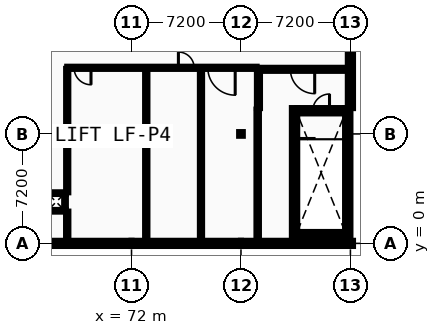
"""IFC4 building model, lengths in metres.
Left out: names, types, materials, properties, quantities, classifications, styles, units other than length and angle.
Written with IfcOpenShell. Run it as: python <this file> out.ifc"""

import sys

from ifc_helpers import new_model, si_unit, direction, frame, frame_2d, origin, origin_2d, place, context, subcontext, project, spatial, rectangle, i_section, extrude, element, fill, save


model = new_model("IFC4")
c1 = context("Model", 3, precision=1e-05, world=origin(), true_north=direction((0.0, 1.0)))
c2 = subcontext(c1, "Body", "Model", "MODEL_VIEW")
j1 = project(units=[si_unit("LENGTHUNIT", "METRE"), si_unit("PLANEANGLEUNIT", "RADIAN")], contexts=[c1])
p1 = place(None, origin())
s1 = spatial("IfcSite", under=j1, at=p1, CompositionType="ELEMENT")
p2 = place(p1, origin())
s2 = spatial("IfcBuilding", under=s1, at=p2, CompositionType="ELEMENT")
p3 = place(p2, frame((0.0, 0.0, 18.4)))
s3 = spatial("IfcBuildingStorey", under=s2, at=p3, CompositionType="ELEMENT", Elevation=18.4)
for number, where, z_axis, x_axis in (
    (1, (72.0, 0.0, 0.0), (0.0, 0.0, 1.0), (1.0, 0.0, 0.0)),
    (2, (72.0, 7.2, 0.0), (0.0, 0.0, 1.0), (1.0, 0.0, 0.0)),
    (3, (79.2, 0.0, 0.0), (0.0, 0.0, 1.0), (1.0, 0.0, 0.0)),
    (4, (79.2, 7.2, 0.0), (0.0, 0.0, 1.0), (1.0, 0.0, 0.0)),
    (5, (86.4, 0.0, 0.0), (0.0, 0.0, 1.0), (1.0, 0.0, 0.0)),
):
    element("IfcColumn", number, at=place(p3, frame(where, z_axis=z_axis, x_axis=x_axis)), inside=s3, PredefinedType="COLUMN", context=c2, shape_type="SweptSolid", body=[
        extrude(i_section(OverallWidth=0.24, OverallDepth=0.24, WebThickness=0.01, FlangeThickness=0.017, FilletRadius=0.021, at=origin_2d()), origin(), (0.0, 0.0, 1.0), 4.4),
    ])
p4 = place(p3, frame((64.8, 0.0, 0.0), z_axis=(0.0, 0.0, 1.0), x_axis=(1.0, 0.0, 0.0)))
e6 = element("IfcWall", 6, at=p4, inside=s3, PredefinedType="STANDARD", context=c2, shape_type="SweptSolid", body=[
    extrude(rectangle(XDim=7.2, YDim=0.34, at=frame_2d((3.6, 0.0))), origin(), (0.0, 0.0, 1.0), 4.035),
])
p5 = place(p4, frame((1.645, 0.0, 0.95)))
e7 = element("IfcOpeningElement", 7, at=p5, cuts=e6, PredefinedType="OPENING", context=c2, shape_type="SweptSolid", body=[
    extrude(rectangle(XDim=1.03, YDim=1.368, at=frame_2d((0.515, 0.684))), frame((0.0, 0.18, 0.0), z_axis=(0.0, -1.0, 0.0), x_axis=(1.0, 0.0, 0.0)), (0.0, 0.0, 1.0), 0.36),
])
p6 = place(p4, frame((4.525, 0.0, 0.95)))
e8 = element("IfcOpeningElement", 8, at=p6, cuts=e6, PredefinedType="OPENING", context=c2, shape_type="SweptSolid", body=[
    extrude(rectangle(XDim=1.03, YDim=1.368, at=frame_2d((0.515, 0.684))), frame((0.0, 0.18, 0.0), z_axis=(0.0, -1.0, 0.0), x_axis=(1.0, 0.0, 0.0)), (0.0, 0.0, 1.0), 0.36),
])
p7 = place(p3, frame((72.0, 0.0, 0.0), z_axis=(0.0, 0.0, 1.0), x_axis=(1.0, 0.0, 0.0)))
e9 = element("IfcWall", 9, at=p7, inside=s3, PredefinedType="STANDARD", context=c2, shape_type="SweptSolid", body=[
    extrude(rectangle(XDim=7.2, YDim=0.34, at=frame_2d((3.6, 0.0))), origin(), (0.0, 0.0, 1.0), 4.035),
])
p8 = place(p7, frame((1.628, 0.0, 0.95)))
e10 = element("IfcOpeningElement", 10, at=p8, cuts=e9, PredefinedType="OPENING", context=c2, shape_type="SweptSolid", body=[
    extrude(rectangle(XDim=1.064, YDim=1.368, at=frame_2d((0.532, 0.684))), frame((0.0, 0.18, 0.0), z_axis=(0.0, -1.0, 0.0), x_axis=(1.0, 0.0, 0.0)), (0.0, 0.0, 1.0), 0.36),
])
p9 = place(p3, frame((79.2, 0.0, 0.0), z_axis=(0.0, 0.0, 1.0), x_axis=(1.0, 0.0, 0.0)))
e11 = element("IfcWall", 11, at=p9, inside=s3, PredefinedType="STANDARD", context=c2, shape_type="SweptSolid", body=[
    extrude(rectangle(XDim=7.37, YDim=0.34, at=frame_2d((3.685, 0.0))), origin(), (0.0, 0.0, 1.0), 4.035),
])
p10 = place(p9, frame((1.662, 0.0, 0.95)))
e12 = element("IfcOpeningElement", 12, at=p10, cuts=e11, PredefinedType="OPENING", context=c2, shape_type="SweptSolid", body=[
    extrude(rectangle(XDim=1.098, YDim=1.368, at=frame_2d((0.549, 0.684))), frame((0.0, 0.18, 0.0), z_axis=(0.0, -1.0, 0.0), x_axis=(1.0, 0.0, 0.0)), (0.0, 0.0, 1.0), 0.36),
])
p11 = place(p9, frame((4.61, 0.0, 0.95)))
e13 = element("IfcOpeningElement", 13, at=p11, cuts=e11, PredefinedType="OPENING", context=c2, shape_type="SweptSolid", body=[
    extrude(rectangle(XDim=1.098, YDim=1.368, at=frame_2d((0.549, 0.684))), frame((0.0, 0.18, 0.0), z_axis=(0.0, -1.0, 0.0), x_axis=(1.0, 0.0, 0.0)), (0.0, 0.0, 1.0), 0.36),
])
p12 = place(p3, frame((86.4, 8.9, 0.0), z_axis=(0.0, 0.0, 1.0), x_axis=(0.0, 1.0, 0.0)))
e14 = element("IfcWall", 14, at=p12, inside=s3, PredefinedType="STANDARD", context=c2, shape_type="SweptSolid", body=[
    extrude(rectangle(XDim=5.5, YDim=0.34, at=frame_2d((2.75, 0.0))), origin(), (0.0, 0.0, 1.0), 4.11),
])
p13 = place(p3, frame((82.9, 0.575, 0.0), z_axis=(0.0, 0.0, 1.0), x_axis=(1.0, 0.0, 0.0)))
e15 = element("IfcWall", 15, at=p13, inside=s3, PredefinedType="SHEAR", context=c2, shape_type="SweptSolid", body=[
    extrude(rectangle(XDim=3.15, YDim=0.35, at=frame_2d((1.575, 0.0))), origin(), (0.0, 0.0, 1.0), 4.18),
])
p14 = place(p3, frame((82.9, 8.725, 0.0), z_axis=(0.0, 0.0, 1.0), x_axis=(1.0, 0.0, 0.0)))
e16 = element("IfcWall", 16, at=p14, inside=s3, PredefinedType="SHEAR", context=c2, shape_type="SweptSolid", body=[
    extrude(rectangle(XDim=3.15, YDim=0.35, at=frame_2d((1.575, 0.0))), origin(), (0.0, 0.0, 1.0), 4.18),
])
p15 = place(p14, frame((1.025, 0.0, 0.0)))
e17 = element("IfcOpeningElement", 17, at=p15, cuts=e16, PredefinedType="OPENING", context=c2, shape_type="SweptSolid", body=[
    extrude(rectangle(XDim=1.1, YDim=2.15, at=frame_2d((0.55, 1.075))), frame((0.0, 0.185, 0.0), z_axis=(0.0, -1.0, 0.0), x_axis=(1.0, 0.0, 0.0)), (0.0, 0.0, 1.0), 0.37),
])
for number, where, z_axis, x_axis in (
    (18, (82.725, 0.17, 0.0), (0.0, 0.0, 1.0), (0.0, 1.0, 0.0)),
    (19, (86.225, 0.17, 0.0), (0.0, 0.0, 1.0), (0.0, 1.0, 0.0)),
):
    element("IfcWall", number, at=place(p3, frame(where, z_axis=z_axis, x_axis=x_axis)), inside=s3, PredefinedType="SHEAR", context=c2, shape_type="SweptSolid", body=[
        extrude(rectangle(XDim=8.73, YDim=0.35, at=frame_2d((4.365, 0.0))), origin(), (0.0, 0.0, 1.0), 4.18),
    ])
p16 = place(p3, frame((80.45, 11.45, 0.0), z_axis=(0.0, 0.0, 1.0), x_axis=(1.0, 0.0, 0.0)))
e20 = element("IfcWall", 20, at=p16, inside=s3, PredefinedType="PARTITIONING", context=c2, shape_type="SweptSolid", body=[
    extrude(rectangle(XDim=5.6, YDim=0.2, at=frame_2d((2.8, 0.0))), origin(), (0.0, 0.0, 1.0), 4.18),
])
p17 = place(p16, frame((2.0, 0.0, 0.0)))
e21 = element("IfcOpeningElement", 21, at=p17, cuts=e20, PredefinedType="OPENING", context=c2, shape_type="SweptSolid", body=[
    extrude(rectangle(XDim=1.6, YDim=2.2, at=frame_2d((0.8, 1.1))), frame((0.0, 0.11, 0.0), z_axis=(0.0, -1.0, 0.0), x_axis=(1.0, 0.0, 0.0)), (0.0, 0.0, 1.0), 0.22),
])
p18 = place(p3, frame((80.35, 8.9, 0.0), z_axis=(0.0, 0.0, 1.0), x_axis=(0.0, 1.0, 0.0)))
e22 = element("IfcWall", 22, at=p18, inside=s3, PredefinedType="PARTITIONING", context=c2, shape_type="SweptSolid", body=[
    extrude(rectangle(XDim=2.45, YDim=0.2, at=frame_2d((1.225, 0.0))), origin(), (0.0, 0.0, 1.0), 4.18),
])
for number, where, z_axis, x_axis in (
    (23, (66.41, 2.145, 0.0), (0.0, 0.0, 1.0), (1.0, 0.0, 0.0)),
    (24, (66.41, 3.305, 0.0), (0.0, 0.0, 1.0), (1.0, 0.0, 0.0)),
):
    element("IfcWall", number, at=place(p3, frame(where, z_axis=z_axis, x_axis=x_axis)), inside=s3, PredefinedType="PARTITIONING", context=c2, shape_type="SweptSolid", body=[
        extrude(rectangle(XDim=1.27, YDim=0.11, at=frame_2d((0.635, 0.0))), origin(), (0.0, 0.0, 1.0), 4.18),
    ])
p19 = place(p3, frame((67.625, 2.2, 0.0), z_axis=(0.0, 0.0, 1.0), x_axis=(0.0, 1.0, 0.0)))
e25 = element("IfcWall", 25, at=p19, inside=s3, PredefinedType="PARTITIONING", context=c2, shape_type="SweptSolid", body=[
    extrude(rectangle(XDim=1.05, YDim=0.11, at=frame_2d((0.525, 0.0))), origin(), (0.0, 0.0, 1.0), 4.18),
])
p20 = place(p3, frame((67.77, 11.55, 0.0), z_axis=(0.0, 0.0, 1.0), x_axis=(1.0, 0.0, 0.0)))
e26 = element("IfcWall", 26, at=p20, inside=s3, PredefinedType="PARTITIONING", context=c2, shape_type="SweptSolid", body=[
    extrude(rectangle(XDim=12.46, YDim=0.142, at=frame_2d((6.23, 0.0))), origin(), (0.0, 0.0, 1.0), 4.18),
])
p21 = place(p20, frame((7.314, 0.0, 0.0)))
e27 = element("IfcOpeningElement", 27, at=p21, cuts=e26, PredefinedType="OPENING", context=c2, shape_type="SweptSolid", body=[
    extrude(rectangle(XDim=1.036, YDim=2.068, at=frame_2d((0.518, 1.034))), frame((0.0, 0.081, 0.0), z_axis=(0.0, -1.0, 0.0), x_axis=(1.0, 0.0, 0.0)), (0.0, 0.0, 1.0), 0.162),
])
p22 = place(p20, frame((9.25, 0.0, 0.0)))
e28 = element("IfcOpeningElement", 28, at=p22, cuts=e26, PredefinedType="OPENING", context=c2, shape_type="SweptSolid", body=[
    extrude(rectangle(XDim=1.8, YDim=2.3, at=frame_2d((0.9, 1.15))), frame((0.0, 0.081, 0.0), z_axis=(0.0, -1.0, 0.0), x_axis=(1.0, 0.0, 0.0)), (0.0, 0.0, 1.0), 0.162),
])
p23 = place(p20, frame((0.45, 0.0, 0.0)))
e29 = element("IfcOpeningElement", 29, at=p23, cuts=e26, PredefinedType="OPENING", context=c2, shape_type="SweptSolid", body=[
    extrude(rectangle(XDim=1.114, YDim=2.068, at=frame_2d((0.557, 1.034))), frame((0.0, 0.081, 0.0), z_axis=(0.0, -1.0, 0.0), x_axis=(1.0, 0.0, 0.0)), (0.0, 0.0, 1.0), 0.162),
])
p24 = place(p3, frame((67.77, 0.2, 0.0), z_axis=(0.0, 0.0, 1.0), x_axis=(0.0, 1.0, 0.0)))
e30 = element("IfcWall", 30, at=p24, inside=s3, PredefinedType="PARTITIONING", context=c2, shape_type="SweptSolid", body=[
    extrude(rectangle(XDim=1.89, YDim=0.15, at=frame_2d((0.945, 0.0))), origin(), (0.0, 0.0, 1.0), 4.18),
])
p25 = place(p3, frame((67.77, 3.36, 0.0), z_axis=(0.0, 0.0, 1.0), x_axis=(0.0, 1.0, 0.0)))
e31 = element("IfcWall", 31, at=p25, inside=s3, PredefinedType="PARTITIONING", context=c2, shape_type="SweptSolid", body=[
    extrude(rectangle(XDim=8.119, YDim=0.142, at=frame_2d((4.06, 0.0))), origin(), (0.0, 0.0, 1.0), 4.18),
])
p26 = place(p3, frame((72.97, 0.2, 0.0), z_axis=(0.0, 0.0, 1.0), x_axis=(0.0, 1.0, 0.0)))
e32 = element("IfcWall", 32, at=p26, inside=s3, PredefinedType="PARTITIONING", context=c2, shape_type="SweptSolid", body=[
    extrude(rectangle(XDim=11.279, YDim=0.15, at=frame_2d((5.64, 0.0))), origin(), (0.0, 0.0, 1.0), 4.18),
])
p27 = place(p3, frame((76.57, 0.2, 0.0), z_axis=(0.0, 0.0, 1.0), x_axis=(0.0, 1.0, 0.0)))
e33 = element("IfcWall", 33, at=p27, inside=s3, PredefinedType="PARTITIONING", context=c2, shape_type="SweptSolid", body=[
    extrude(rectangle(XDim=11.279, YDim=0.142, at=frame_2d((5.64, 0.0))), origin(), (0.0, 0.0, 1.0), 4.18),
])
p28 = place(p3, frame((80.3, 0.2, 0.0), z_axis=(0.0, 0.0, 1.0), x_axis=(0.0, 1.0, 0.0)))
e34 = element("IfcWall", 34, at=p28, inside=s3, PredefinedType="PARTITIONING", context=c2, shape_type="SweptSolid", body=[
    extrude(rectangle(XDim=8.6, YDim=0.16, at=frame_2d((4.3, 0.0))), origin(), (0.0, 0.0, 1.0), 4.18),
])
p29 = place(p5, origin())
e35 = element("IfcWindow", 35, at=p29, inside=s3, PartitioningType="SINGLE_PANEL", PredefinedType="WINDOW", context=c2, shape_type="SweptSolid", body=[
    extrude(rectangle(XDim=1.03, YDim=1.368, at=frame_2d((0.515, 0.684))), frame((0.0, 0.03, 0.0), z_axis=(0.0, -1.0, 0.0), x_axis=(1.0, 0.0, 0.0)), (0.0, 0.0, 1.0), 0.06),
])
fill(e7, e35)
p30 = place(p6, origin())
e36 = element("IfcWindow", 36, at=p30, inside=s3, PartitioningType="SINGLE_PANEL", PredefinedType="WINDOW", context=c2, shape_type="SweptSolid", body=[
    extrude(rectangle(XDim=1.03, YDim=1.368, at=frame_2d((0.515, 0.684))), frame((0.0, 0.03, 0.0), z_axis=(0.0, -1.0, 0.0), x_axis=(1.0, 0.0, 0.0)), (0.0, 0.0, 1.0), 0.06),
])
fill(e8, e36)
p31 = place(p8, origin())
e37 = element("IfcWindow", 37, at=p31, inside=s3, PartitioningType="SINGLE_PANEL", PredefinedType="WINDOW", context=c2, shape_type="SweptSolid", body=[
    extrude(rectangle(XDim=1.064, YDim=1.368, at=frame_2d((0.532, 0.684))), frame((0.0, 0.03, 0.0), z_axis=(0.0, -1.0, 0.0), x_axis=(1.0, 0.0, 0.0)), (0.0, 0.0, 1.0), 0.06),
])
fill(e10, e37)
p32 = place(p10, origin())
e38 = element("IfcWindow", 38, at=p32, inside=s3, PartitioningType="SINGLE_PANEL", PredefinedType="WINDOW", context=c2, shape_type="SweptSolid", body=[
    extrude(rectangle(XDim=1.098, YDim=1.368, at=frame_2d((0.549, 0.684))), frame((0.0, 0.03, 0.0), z_axis=(0.0, -1.0, 0.0), x_axis=(1.0, 0.0, 0.0)), (0.0, 0.0, 1.0), 0.06),
])
fill(e12, e38)
p33 = place(p11, origin())
e39 = element("IfcWindow", 39, at=p33, inside=s3, PartitioningType="SINGLE_PANEL", PredefinedType="WINDOW", context=c2, shape_type="SweptSolid", body=[
    extrude(rectangle(XDim=1.098, YDim=1.368, at=frame_2d((0.549, 0.684))), frame((0.0, 0.03, 0.0), z_axis=(0.0, -1.0, 0.0), x_axis=(1.0, 0.0, 0.0)), (0.0, 0.0, 1.0), 0.06),
])
fill(e13, e39)
p34 = place(p15, frame((1.1, 0.0, 0.0), z_axis=(0.0, 0.0, 1.0), x_axis=(-1.0, 0.0, 0.0)))
e40 = element("IfcDoor", 40, at=p34, inside=s3, OperationType="SINGLE_SWING_RIGHT", PredefinedType="DOOR", context=c2, shape_type="SweptSolid", body=[
    extrude(rectangle(XDim=1.1, YDim=2.15, at=frame_2d((0.55, 1.075))), frame((0.0, 0.025, 0.0), z_axis=(0.0, -1.0, 0.0), x_axis=(1.0, 0.0, 0.0)), (0.0, 0.0, 1.0), 0.05),
])
fill(e17, e40)
p35 = place(p17, origin())
e41 = element("IfcDoor", 41, at=p35, inside=s3, OperationType="DOUBLE_DOOR_SINGLE_SWING", PredefinedType="DOOR", context=c2, shape_type="SweptSolid", body=[
    extrude(rectangle(XDim=1.6, YDim=2.2, at=frame_2d((0.8, 1.1))), frame((0.0, 0.025, 0.0), z_axis=(0.0, -1.0, 0.0), x_axis=(1.0, 0.0, 0.0)), (0.0, 0.0, 1.0), 0.05),
])
fill(e21, e41)
p36 = place(p21, origin())
e42 = element("IfcDoor", 42, at=p36, inside=s3, OperationType="SINGLE_SWING_LEFT", PredefinedType="DOOR", context=c2, shape_type="SweptSolid", body=[
    extrude(rectangle(XDim=1.036, YDim=2.068, at=frame_2d((0.518, 1.034))), frame((0.0, 0.025, 0.0), z_axis=(0.0, -1.0, 0.0), x_axis=(1.0, 0.0, 0.0)), (0.0, 0.0, 1.0), 0.05),
])
fill(e27, e42)
p37 = place(p22, origin())
e43 = element("IfcDoor", 43, at=p37, inside=s3, OperationType="DOUBLE_DOOR_SINGLE_SWING", PredefinedType="DOOR", context=c2, shape_type="SweptSolid", body=[
    extrude(rectangle(XDim=1.8, YDim=2.3, at=frame_2d((0.9, 1.15))), frame((0.0, 0.025, 0.0), z_axis=(0.0, -1.0, 0.0), x_axis=(1.0, 0.0, 0.0)), (0.0, 0.0, 1.0), 0.05),
])
fill(e28, e43)
p38 = place(p23, origin())
e44 = element("IfcDoor", 44, at=p38, inside=s3, OperationType="SINGLE_SWING_RIGHT", PredefinedType="DOOR", context=c2, shape_type="SweptSolid", body=[
    extrude(rectangle(XDim=1.114, YDim=2.068, at=frame_2d((0.557, 1.034))), frame((0.0, 0.025, 0.0), z_axis=(0.0, -1.0, 0.0), x_axis=(1.0, 0.0, 0.0)), (0.0, 0.0, 1.0), 0.05),
])
fill(e29, e44)
save(model, sys.argv[1])
